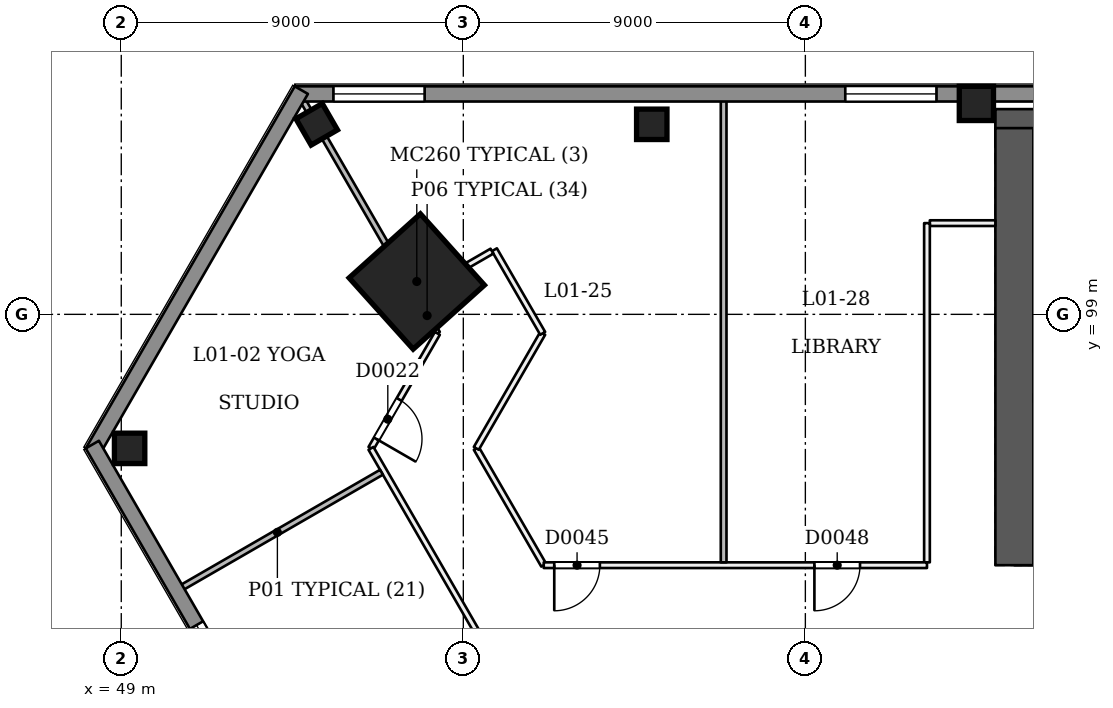
"""IFC4 building model, lengths in metres.
Left out: names, types, materials, properties, quantities, classifications, styles, units other than length and angle.
Written with IfcOpenShell. Run it as: python <this file> out.ifc"""

import sys

from ifc_helpers import new_model, si_unit, direction, frame, frame_2d, origin, origin_2d, place, context, subcontext, project, spatial, rectangle, extrude, element, fill, save


model = new_model("IFC4")
c1 = context("Model", 3, precision=1e-05, world=origin(), true_north=direction((0.0, 1.0)))
c2 = subcontext(c1, "Body", "Model", "MODEL_VIEW")
j1 = project(units=[si_unit("LENGTHUNIT", "METRE"), si_unit("PLANEANGLEUNIT", "RADIAN")], contexts=[c1])
p1 = place(None, origin())
s1 = spatial("IfcSite", under=j1, at=p1, CompositionType="ELEMENT")
p2 = place(p1, origin())
s2 = spatial("IfcBuilding", under=s1, at=p2, CompositionType="ELEMENT")
p3 = place(p2, frame((0.0, 0.0, 9.0)))
s3 = spatial("IfcBuildingStorey", under=s2, at=p3, CompositionType="ELEMENT", Elevation=9.0)
p4 = place(p3, frame((72.5, 92.9, 0.0), z_axis=(0.0, 0.0, 1.0), x_axis=(1.0, 0.0, 0.0)))
e1 = element("IfcWall", 1, at=p4, inside=s3, PredefinedType="SHEAR", context=c2, shape_type="SweptSolid", body=[
    extrude(rectangle(XDim=25.5, YDim=1.0, at=frame_2d((12.75, 0.0))), origin(), (0.0, 0.0, 1.0), 4.5),
])
p5 = place(p4, frame((1.3, 0.0, 0.0)))
e2 = element("IfcOpeningElement", 2, at=p5, cuts=e1, PredefinedType="OPENING", context=c2, shape_type="SweptSolid", body=[
    extrude(rectangle(XDim=1.2, YDim=2.1, at=frame_2d((0.6, 1.05))), frame((0.0, 0.51, 0.0), z_axis=(0.0, -1.0, 0.0), x_axis=(1.0, 0.0, 0.0)), (0.0, 0.0, 1.0), 1.021),
])
p6 = place(p4, frame((3.5, 0.0, 0.0)))
e3 = element("IfcOpeningElement", 3, at=p6, cuts=e1, PredefinedType="OPENING", context=c2, shape_type="SweptSolid", body=[
    extrude(rectangle(XDim=1.2, YDim=2.1, at=frame_2d((0.6, 1.05))), frame((0.0, 0.51, 0.0), z_axis=(0.0, -1.0, 0.0), x_axis=(1.0, 0.0, 0.0)), (0.0, 0.0, 1.0), 1.021),
])
p7 = place(p4, frame((13.5, 0.0, 0.0)))
e4 = element("IfcOpeningElement", 4, at=p7, cuts=e1, PredefinedType="OPENING", context=c2, shape_type="SweptSolid", body=[
    extrude(rectangle(XDim=1.2, YDim=2.1, at=frame_2d((0.6, 1.05))), frame((0.0, 0.51, 0.0), z_axis=(0.0, -1.0, 0.0), x_axis=(1.0, 0.0, 0.0)), (0.0, 0.0, 1.0), 1.021),
])
p8 = place(p4, frame((16.163, 0.0, 0.0)))
e5 = element("IfcOpeningElement", 5, at=p8, cuts=e1, PredefinedType="OPENING", context=c2, shape_type="SweptSolid", body=[
    extrude(rectangle(XDim=1.0, YDim=2.1, at=frame_2d((0.5, 1.05))), frame((0.0, 0.51, 0.0), z_axis=(0.0, -1.0, 0.0), x_axis=(1.0, 0.0, 0.0)), (0.0, 0.0, 1.0), 1.021),
])
p9 = place(p4, frame((18.95, 0.0, 0.0)))
e6 = element("IfcOpeningElement", 6, at=p9, cuts=e1, PredefinedType="OPENING", context=c2, shape_type="SweptSolid", body=[
    extrude(rectangle(XDim=1.0, YDim=2.1, at=frame_2d((0.5, 1.05))), frame((0.0, 0.51, 0.0), z_axis=(0.0, -1.0, 0.0), x_axis=(1.0, 0.0, 0.0)), (0.0, 0.0, 1.0), 1.021),
])
p10 = place(p4, frame((22.137, 0.0, 0.0)))
e7 = element("IfcOpeningElement", 7, at=p10, cuts=e1, PredefinedType="OPENING", context=c2, shape_type="SweptSolid", body=[
    extrude(rectangle(XDim=1.0, YDim=2.1, at=frame_2d((0.5, 1.05))), frame((0.0, 0.51, 0.0), z_axis=(0.0, -1.0, 0.0), x_axis=(1.0, 0.0, 0.0)), (0.0, 0.0, 1.0), 1.021),
])
p11 = place(p3, frame((97.5, 103.9, 0.0), z_axis=(0.0, 0.0, 1.0), x_axis=(-1.0, 0.0, 0.0)))
e8 = element("IfcWall", 8, at=p11, inside=s3, PredefinedType="SHEAR", context=c2, shape_type="SweptSolid", body=[
    extrude(rectangle(XDim=25.5, YDim=1.0, at=frame_2d((12.75, 0.0))), origin(), (0.0, 0.0, 1.0), 4.5),
])
p12 = place(p3, frame((72.5, 103.9, 0.0), z_axis=(0.0, 0.0, 1.0), x_axis=(0.0, -1.0, 0.0)))
e9 = element("IfcWall", 9, at=p12, inside=s3, PredefinedType="SHEAR", context=c2, shape_type="SweptSolid", body=[
    extrude(rectangle(XDim=11.5, YDim=1.0, at=frame_2d((5.75, 0.0))), origin(), (0.0, 0.0, 1.0), 4.5),
])
p13 = place(p3, frame((56.741, 99.853, 0.0), z_axis=(0.028416130736, 0.009218973712, 0.999553667412), x_axis=(-0.865053397917, 0.501282210701, 0.019969075775)))
e10 = element("IfcColumn", 10, at=p13, inside=s3, PredefinedType="COLUMN", context=c2, shape_type="SweptSolid", body=[
    extrude(rectangle(XDim=2.52, YDim=2.52, at=origin_2d()), origin(), (0.0, 0.0, 1.0), 4.502),
])
p14 = place(p3, frame((71.5, 104.55, 0.0), z_axis=(0.0, 0.0, 1.0), x_axis=(1.0, 0.0, 0.0)))
e11 = element("IfcColumn", 11, at=p14, inside=s3, PredefinedType="COLUMN", context=c2, shape_type="SweptSolid", body=[
    extrude(rectangle(XDim=0.9, YDim=0.9, at=origin_2d()), origin(), (0.0, 0.0, 1.0), 4.5),
])
for number, where, z_axis, x_axis in (
    (12, (62.959, 104.0, 0.0), (0.0, 0.0, 1.0), (1.0, 0.0, 0.0)),
    (13, (54.142, 104.0, 0.0), (0.0, 0.0, 1.0), (0.866, 0.5, 0.0)),
    (14, (49.219, 95.474, 0.0), (0.0, 0.0, 1.0), (1.0, 1.745e-08, 0.0)),
):
    element("IfcColumn", number, at=place(p3, frame(where, z_axis=z_axis, x_axis=x_axis)), inside=s3, PredefinedType="COLUMN", context=c2, shape_type="SweptSolid", body=[
        extrude(rectangle(XDim=0.8, YDim=0.8, at=origin_2d()), origin(), (0.0, 0.0, 1.0), 4.5),
    ])
p15 = place(p3, frame((56.778, 99.435, 0.0), z_axis=(0.0, 0.0, 1.0), x_axis=(0.500126914667, -0.865952117167, 0.0)))
e15 = element("IfcWall", 15, at=p15, inside=s3, PredefinedType="PARTITIONING", context=c2, shape_type="SweptSolid", body=[
    extrude(rectangle(XDim=1.08, YDim=0.15, at=frame_2d((0.54, 0.0))), origin(), (0.0, 0.0, 1.0), 4.05),
])
p16 = place(p3, frame((57.318, 98.5, 0.0), z_axis=(0.0, 0.0, 1.0), x_axis=(-0.500008701212, -0.866020380079, 0.0)))
e16 = element("IfcWall", 16, at=p16, inside=s3, PredefinedType="PARTITIONING", context=c2, shape_type="SweptSolid", body=[
    extrude(rectangle(XDim=3.495, YDim=0.15, at=frame_2d((1.747, 0.0))), origin(), (0.0, 0.0, 1.0), 4.05),
])
p17 = place(p16, frame((2.009, 0.0, 0.0)))
e17 = element("IfcOpeningElement", 17, at=p17, cuts=e16, PredefinedType="OPENING", context=c2, shape_type="SweptSolid", body=[
    extrude(rectangle(XDim=1.2, YDim=2.1, at=frame_2d((0.6, 1.05))), frame((0.0, 0.085, 0.0), z_axis=(0.0, -1.0, 0.0), x_axis=(1.0, 0.0, 0.0)), (0.0, 0.0, 1.0), 0.171),
])
p18 = place(p3, frame((55.57, 95.474, 0.0), z_axis=(0.0, 0.0, 1.0), x_axis=(0.500000085768, -0.866025354266, 0.0)))
e18 = element("IfcWall", 18, at=p18, inside=s3, PredefinedType="PARTITIONING", context=c2, shape_type="SweptSolid", body=[
    extrude(rectangle(XDim=55.365, YDim=0.15, at=frame_2d((27.682, 0.0))), origin(), (0.0, 0.0, 1.0), 4.05),
])
p19 = place(p18, frame((6.832, 0.0, 0.0)))
e19 = element("IfcOpeningElement", 19, at=p19, cuts=e18, PredefinedType="OPENING", context=c2, shape_type="SweptSolid", body=[
    extrude(rectangle(XDim=1.2, YDim=2.1, at=frame_2d((0.6, 1.05))), frame((0.0, 0.085, 0.0), z_axis=(0.0, -1.0, 0.0), x_axis=(1.0, 0.0, 0.0)), (0.0, 0.0, 1.0), 0.171),
])
p20 = place(p18, frame((18.182, 0.0, 0.0)))
e20 = element("IfcOpeningElement", 20, at=p20, cuts=e18, PredefinedType="OPENING", context=c2, shape_type="SweptSolid", body=[
    extrude(rectangle(XDim=1.0, YDim=2.1, at=frame_2d((0.5, 1.05))), frame((0.0, 0.085, 0.0), z_axis=(0.0, -1.0, 0.0), x_axis=(1.0, 0.0, 0.0)), (0.0, 0.0, 1.0), 0.171),
])
p21 = place(p18, frame((30.132, 0.0, 0.0)))
e21 = element("IfcOpeningElement", 21, at=p21, cuts=e18, PredefinedType="OPENING", context=c2, shape_type="SweptSolid", body=[
    extrude(rectangle(XDim=1.2, YDim=2.1, at=frame_2d((0.6, 1.05))), frame((0.0, 0.085, 0.0), z_axis=(0.0, -1.0, 0.0), x_axis=(1.0, 0.0, 0.0)), (0.0, 0.0, 1.0), 0.171),
])
p22 = place(p18, frame((40.582, 0.0, 0.0)))
e22 = element("IfcOpeningElement", 22, at=p22, cuts=e18, PredefinedType="OPENING", context=c2, shape_type="SweptSolid", body=[
    extrude(rectangle(XDim=1.2, YDim=2.1, at=frame_2d((0.6, 1.05))), frame((0.0, 0.085, 0.0), z_axis=(0.0, -1.0, 0.0), x_axis=(1.0, 0.0, 0.0)), (0.0, 0.0, 1.0), 0.171),
])
p23 = place(p18, frame((46.315, 0.0, 0.0)))
e23 = element("IfcOpeningElement", 23, at=p23, cuts=e18, PredefinedType="OPENING", context=c2, shape_type="SweptSolid", body=[
    extrude(rectangle(XDim=0.9, YDim=2.1, at=frame_2d((0.45, 1.05))), frame((0.0, 0.085, 0.0), z_axis=(0.0, -1.0, 0.0), x_axis=(1.0, 0.0, 0.0)), (0.0, 0.0, 1.0), 0.171),
])
p24 = place(p18, frame((48.565, 0.0, 0.0)))
e24 = element("IfcOpeningElement", 24, at=p24, cuts=e18, PredefinedType="OPENING", context=c2, shape_type="SweptSolid", body=[
    extrude(rectangle(XDim=0.9, YDim=2.1, at=frame_2d((0.45, 1.05))), frame((0.0, 0.085, 0.0), z_axis=(0.0, -1.0, 0.0), x_axis=(1.0, 0.0, 0.0)), (0.0, 0.0, 1.0), 0.171),
])
p25 = place(p18, frame((53.195, 0.0, 0.0)))
e25 = element("IfcOpeningElement", 25, at=p25, cuts=e18, PredefinedType="OPENING", context=c2, shape_type="SweptSolid", body=[
    extrude(rectangle(XDim=1.2, YDim=2.1, at=frame_2d((0.6, 1.05))), frame((0.0, 0.085, 0.0), z_axis=(0.0, -1.0, 0.0), x_axis=(1.0, 0.0, 0.0)), (0.0, 0.0, 1.0), 0.171),
])
p26 = place(p3, frame((60.116, 92.4, 0.0), z_axis=(0.0, 0.0, 1.0), x_axis=(-0.500008260065, 0.866020634781, 0.0)))
e26 = element("IfcWall", 26, at=p26, inside=s3, PredefinedType="PARTITIONING", context=c2, shape_type="SweptSolid", body=[
    extrude(rectangle(XDim=3.549, YDim=0.15, at=frame_2d((1.775, 0.0))), origin(), (0.0, 0.0, 1.0), 4.05),
])
p27 = place(p3, frame((58.342, 95.474, 0.0), z_axis=(0.0, 0.0, 1.0), x_axis=(0.500008701212, 0.866020380079, 0.0)))
e27 = element("IfcWall", 27, at=p27, inside=s3, PredefinedType="PARTITIONING", context=c2, shape_type="SweptSolid", body=[
    extrude(rectangle(XDim=3.495, YDim=0.15, at=frame_2d((1.747, 0.0))), origin(), (0.0, 0.0, 1.0), 4.05),
])
p28 = place(p3, frame((60.089, 98.5, 0.0), z_axis=(0.0, 0.0, 1.0), x_axis=(-0.500035802948, 0.866004731956, 0.0)))
e28 = element("IfcWall", 28, at=p28, inside=s3, PredefinedType="PARTITIONING", context=c2, shape_type="SweptSolid", body=[
    extrude(rectangle(XDim=2.54, YDim=0.15, at=frame_2d((1.27, 0.0))), origin(), (0.0, 0.0, 1.0), 4.05),
])
p29 = place(p3, frame((58.754, 100.663, 0.0), z_axis=(0.0, 0.0, 1.0), x_axis=(-0.866017533419, -0.500013631625, 0.0)))
e29 = element("IfcWall", 29, at=p29, inside=s3, PredefinedType="PARTITIONING", context=c2, shape_type="SweptSolid", body=[
    extrude(rectangle(XDim=2.25, YDim=0.15, at=frame_2d((1.125, 0.0))), origin(), (0.0, 0.0, 1.0), 4.05),
])
p30 = place(p3, frame((72.0, 101.4, 0.0), z_axis=(0.0, 0.0, 1.0), x_axis=(-1.0, 0.0, 0.0)))
e30 = element("IfcWall", 30, at=p30, inside=s3, PredefinedType="PARTITIONING", context=c2, shape_type="SweptSolid", body=[
    extrude(rectangle(XDim=1.725, YDim=0.15, at=frame_2d((0.863, 0.0))), origin(), (0.0, 0.0, 1.0), 4.05),
])
p31 = place(p3, frame((70.2, 101.4, 0.0), z_axis=(0.0, 0.0, 1.0), x_axis=(0.0, -1.0, 0.0)))
e31 = element("IfcWall", 31, at=p31, inside=s3, PredefinedType="PARTITIONING", context=c2, shape_type="SweptSolid", body=[
    extrude(rectangle(XDim=8.925, YDim=0.15, at=frame_2d((4.462, 0.0))), origin(), (0.0, 0.0, 1.0), 4.05),
])
p32 = place(p3, frame((70.2, 92.4, 0.0), z_axis=(0.0, 0.0, 1.0), x_axis=(-1.0, 0.0, 0.0)))
e32 = element("IfcWall", 32, at=p32, inside=s3, PredefinedType="PARTITIONING", context=c2, shape_type="SweptSolid", body=[
    extrude(rectangle(XDim=10.084, YDim=0.15, at=frame_2d((5.042, 0.0))), origin(), (0.0, 0.0, 1.0), 4.05),
])
p33 = place(p32, frame((8.607, 0.0, 0.0)))
e33 = element("IfcOpeningElement", 33, at=p33, cuts=e32, PredefinedType="OPENING", context=c2, shape_type="SweptSolid", body=[
    extrude(rectangle(XDim=1.2, YDim=2.1, at=frame_2d((0.6, 1.05))), frame((0.0, 0.085, 0.0), z_axis=(0.0, -1.0, 0.0), x_axis=(1.0, 0.0, 0.0)), (0.0, 0.0, 1.0), 0.171),
])
p34 = place(p32, frame((1.762, 0.0, 0.0)))
e34 = element("IfcOpeningElement", 34, at=p34, cuts=e32, PredefinedType="OPENING", context=c2, shape_type="SweptSolid", body=[
    extrude(rectangle(XDim=1.2, YDim=2.1, at=frame_2d((0.6, 1.05))), frame((0.0, 0.085, 0.0), z_axis=(0.0, -1.0, 0.0), x_axis=(1.0, 0.0, 0.0)), (0.0, 0.0, 1.0), 0.171),
])
p35 = place(p3, frame((50.369, 91.683, 0.0), z_axis=(0.0, 0.0, 1.0), x_axis=(0.866025537322, 0.499999768706, 0.0)))
e35 = element("IfcWall", 35, at=p35, inside=s3, PredefinedType="PARTITIONING", context=c2, shape_type="SweptSolid", body=[
    extrude(rectangle(XDim=6.325, YDim=0.15, at=frame_2d((3.163, 0.0))), origin(), (0.0, 0.0, 1.0), 4.05),
])
p36 = place(p3, frame((56.74, 99.5, 0.0), z_axis=(0.0, 0.0, 1.0), x_axis=(-0.500004896655, 0.866022576681, 0.0)))
e36 = element("IfcWall", 36, at=p36, inside=s3, PredefinedType="PARTITIONING", context=c2, shape_type="SweptSolid", body=[
    extrude(rectangle(XDim=6.235, YDim=0.15, at=frame_2d((3.118, 0.0))), origin(), (0.0, 0.0, 1.0), 4.05),
])
p37 = place(p3, frame((64.85, 92.475, 0.0), z_axis=(0.0, 0.0, 1.0), x_axis=(0.0, 1.0, 0.0)))
e37 = element("IfcWall", 37, at=p37, inside=s3, PredefinedType="PARTITIONING", context=c2, shape_type="SweptSolid", body=[
    extrude(rectangle(XDim=12.425, YDim=0.15, at=frame_2d((6.212, 0.0))), origin(), (0.0, 0.0, 1.0), 4.05),
])
p38 = place(p3, frame((53.565, 104.8, 0.0), z_axis=(0.0, 0.0, 1.0), x_axis=(1.0, 0.0, 0.0)))
e38 = element("IfcWall", 38, at=p38, inside=s3, PredefinedType="SOLIDWALL", context=c2, shape_type="SweptSolid", body=[
    extrude(rectangle(XDim=62.871, YDim=0.4, at=frame_2d((31.435, 0.0))), origin(), (0.0, 0.0, 1.0), 4.05),
])
p39 = place(p38, frame((59.452, 0.0, 0.9)))
e39 = element("IfcOpeningElement", 39, at=p39, cuts=e38, PredefinedType="OPENING", context=c2, shape_type="SweptSolid", body=[
    extrude(rectangle(XDim=2.4, YDim=1.5, at=frame_2d((1.2, 0.75))), frame((0.0, 0.21, 0.0), z_axis=(0.0, -1.0, 0.0), x_axis=(1.0, 0.0, 0.0)), (0.0, 0.0, 1.0), 0.421),
])
p40 = place(p38, frame((54.986, 0.0, 0.9)))
e40 = element("IfcOpeningElement", 40, at=p40, cuts=e38, PredefinedType="OPENING", context=c2, shape_type="SweptSolid", body=[
    extrude(rectangle(XDim=2.4, YDim=1.5, at=frame_2d((1.2, 0.75))), frame((0.0, 0.21, 0.0), z_axis=(0.0, -1.0, 0.0), x_axis=(1.0, 0.0, 0.0)), (0.0, 0.0, 1.0), 0.421),
])
p41 = place(p38, frame((45.986, 0.0, 0.9)))
e41 = element("IfcOpeningElement", 41, at=p41, cuts=e38, PredefinedType="OPENING", context=c2, shape_type="SweptSolid", body=[
    extrude(rectangle(XDim=2.4, YDim=1.5, at=frame_2d((1.2, 0.75))), frame((0.0, 0.21, 0.0), z_axis=(0.0, -1.0, 0.0), x_axis=(1.0, 0.0, 0.0)), (0.0, 0.0, 1.0), 0.421),
])
p42 = place(p38, frame((14.486, 0.0, 0.9)))
e42 = element("IfcOpeningElement", 42, at=p42, cuts=e38, PredefinedType="OPENING", context=c2, shape_type="SweptSolid", body=[
    extrude(rectangle(XDim=2.4, YDim=1.5, at=frame_2d((1.2, 0.75))), frame((0.0, 0.21, 0.0), z_axis=(0.0, -1.0, 0.0), x_axis=(1.0, 0.0, 0.0)), (0.0, 0.0, 1.0), 0.421),
])
p43 = place(p38, frame((1.018, 0.0, 0.9)))
e43 = element("IfcOpeningElement", 43, at=p43, cuts=e38, PredefinedType="OPENING", context=c2, shape_type="SweptSolid", body=[
    extrude(rectangle(XDim=2.4, YDim=1.5, at=frame_2d((1.2, 0.75))), frame((0.0, 0.21, 0.0), z_axis=(0.0, -1.0, 0.0), x_axis=(1.0, 0.0, 0.0)), (0.0, 0.0, 1.0), 0.421),
])
p44 = place(p3, frame((48.238, 95.374, 0.0), z_axis=(0.0, 0.0, 1.0), x_axis=(0.50000615651, 0.866021849293, 0.0)))
e44 = element("IfcWall", 44, at=p44, inside=s3, PredefinedType="SOLIDWALL", context=c2, shape_type="SweptSolid", body=[
    extrude(rectangle(XDim=11.0, YDim=0.4, at=frame_2d((5.5, 0.0))), origin(), (0.0, 0.0, 1.0), 4.05),
])
p45 = place(p3, frame((79.673, 41.126, 0.0), z_axis=(0.0, 0.0, 1.0), x_axis=(-0.499997306052, 0.866026959131, 0.0)))
e45 = element("IfcWall", 45, at=p45, inside=s3, PredefinedType="SOLIDWALL", context=c2, shape_type="SweptSolid", body=[
    extrude(rectangle(XDim=62.87, YDim=0.4, at=frame_2d((31.435, 0.0))), origin(), (0.0, 0.0, 1.0), 4.05),
])
p46 = place(p45, frame((54.986, 0.0, 0.9)))
e46 = element("IfcOpeningElement", 46, at=p46, cuts=e45, PredefinedType="OPENING", context=c2, shape_type="SweptSolid", body=[
    extrude(rectangle(XDim=2.4, YDim=1.5, at=frame_2d((1.2, 0.75))), frame((0.0, 0.21, 0.0), z_axis=(0.0, -1.0, 0.0), x_axis=(1.0, 0.0, 0.0)), (0.0, 0.0, 1.0), 0.421),
])
p47 = place(p45, frame((50.486, 0.0, 0.9)))
e47 = element("IfcOpeningElement", 47, at=p47, cuts=e45, PredefinedType="OPENING", context=c2, shape_type="SweptSolid", body=[
    extrude(rectangle(XDim=2.4, YDim=1.5, at=frame_2d((1.2, 0.75))), frame((0.0, 0.21, 0.0), z_axis=(0.0, -1.0, 0.0), x_axis=(1.0, 0.0, 0.0)), (0.0, 0.0, 1.0), 0.421),
])
p48 = place(p45, frame((45.986, 0.0, 0.9)))
e48 = element("IfcOpeningElement", 48, at=p48, cuts=e45, PredefinedType="OPENING", context=c2, shape_type="SweptSolid", body=[
    extrude(rectangle(XDim=2.4, YDim=1.5, at=frame_2d((1.2, 0.75))), frame((0.0, 0.21, 0.0), z_axis=(0.0, -1.0, 0.0), x_axis=(1.0, 0.0, 0.0)), (0.0, 0.0, 1.0), 0.421),
])
p49 = place(p45, frame((32.486, 0.0, 0.9)))
e49 = element("IfcOpeningElement", 49, at=p49, cuts=e45, PredefinedType="OPENING", context=c2, shape_type="SweptSolid", body=[
    extrude(rectangle(XDim=2.4, YDim=1.5, at=frame_2d((1.2, 0.75))), frame((0.0, 0.21, 0.0), z_axis=(0.0, -1.0, 0.0), x_axis=(1.0, 0.0, 0.0)), (0.0, 0.0, 1.0), 0.421),
])
p50 = place(p45, frame((27.986, 0.0, 0.9)))
e50 = element("IfcOpeningElement", 50, at=p50, cuts=e45, PredefinedType="OPENING", context=c2, shape_type="SweptSolid", body=[
    extrude(rectangle(XDim=2.4, YDim=1.5, at=frame_2d((1.2, 0.75))), frame((0.0, 0.21, 0.0), z_axis=(0.0, -1.0, 0.0), x_axis=(1.0, 0.0, 0.0)), (0.0, 0.0, 1.0), 0.421),
])
p51 = place(p45, frame((23.486, 0.0, 0.9)))
e51 = element("IfcOpeningElement", 51, at=p51, cuts=e45, PredefinedType="OPENING", context=c2, shape_type="SweptSolid", body=[
    extrude(rectangle(XDim=2.4, YDim=1.5, at=frame_2d((1.2, 0.75))), frame((0.0, 0.21, 0.0), z_axis=(0.0, -1.0, 0.0), x_axis=(1.0, 0.0, 0.0)), (0.0, 0.0, 1.0), 0.421),
])
p52 = place(p45, frame((18.986, 0.0, 0.9)))
e52 = element("IfcOpeningElement", 52, at=p52, cuts=e45, PredefinedType="OPENING", context=c2, shape_type="SweptSolid", body=[
    extrude(rectangle(XDim=2.4, YDim=1.5, at=frame_2d((1.2, 0.75))), frame((0.0, 0.21, 0.0), z_axis=(0.0, -1.0, 0.0), x_axis=(1.0, 0.0, 0.0)), (0.0, 0.0, 1.0), 0.421),
])
p53 = place(p45, frame((14.486, 0.0, 0.9)))
e53 = element("IfcOpeningElement", 53, at=p53, cuts=e45, PredefinedType="OPENING", context=c2, shape_type="SweptSolid", body=[
    extrude(rectangle(XDim=2.4, YDim=1.5, at=frame_2d((1.2, 0.75))), frame((0.0, 0.21, 0.0), z_axis=(0.0, -1.0, 0.0), x_axis=(1.0, 0.0, 0.0)), (0.0, 0.0, 1.0), 0.421),
])
p54 = place(p17, origin())
e54 = element("IfcDoor", 54, at=p54, inside=s3, OperationType="SINGLE_SWING_RIGHT", PredefinedType="NOTDEFINED", context=c2, shape_type="SweptSolid", body=[
    extrude(rectangle(XDim=1.2, YDim=2.1, at=frame_2d((0.6, 1.05))), frame((0.0, 0.025, 0.0), z_axis=(0.0, -1.0, 0.0), x_axis=(1.0, 0.0, 0.0)), (0.0, 0.0, 1.0), 0.05),
])
fill(e17, e54)
p55 = place(p33, origin())
e55 = element("IfcDoor", 55, at=p55, inside=s3, OperationType="SINGLE_SWING_RIGHT", PredefinedType="NOTDEFINED", context=c2, shape_type="SweptSolid", body=[
    extrude(rectangle(XDim=1.2, YDim=2.1, at=frame_2d((0.6, 1.05))), frame((0.0, 0.025, 0.0), z_axis=(0.0, -1.0, 0.0), x_axis=(1.0, 0.0, 0.0)), (0.0, 0.0, 1.0), 0.05),
])
fill(e33, e55)
p56 = place(p34, origin())
e56 = element("IfcDoor", 56, at=p56, inside=s3, OperationType="SINGLE_SWING_RIGHT", PredefinedType="NOTDEFINED", context=c2, shape_type="SweptSolid", body=[
    extrude(rectangle(XDim=1.2, YDim=2.1, at=frame_2d((0.6, 1.05))), frame((0.0, 0.025, 0.0), z_axis=(0.0, -1.0, 0.0), x_axis=(1.0, 0.0, 0.0)), (0.0, 0.0, 1.0), 0.05),
])
fill(e34, e56)
p57 = place(p42, origin())
e57 = element("IfcWindow", 57, at=p57, inside=s3, PartitioningType="SINGLE_PANEL", PredefinedType="WINDOW", context=c2, shape_type="SweptSolid", body=[
    extrude(rectangle(XDim=2.4, YDim=1.5, at=frame_2d((1.2, 0.75))), frame((0.0, 0.03, 0.0), z_axis=(0.0, -1.0, 0.0), x_axis=(1.0, 0.0, 0.0)), (0.0, 0.0, 1.0), 0.06),
])
fill(e42, e57)
p58 = place(p43, origin())
e58 = element("IfcWindow", 58, at=p58, inside=s3, PartitioningType="SINGLE_PANEL", PredefinedType="WINDOW", context=c2, shape_type="SweptSolid", body=[
    extrude(rectangle(XDim=2.4, YDim=1.5, at=frame_2d((1.2, 0.75))), frame((0.0, 0.03, 0.0), z_axis=(0.0, -1.0, 0.0), x_axis=(1.0, 0.0, 0.0)), (0.0, 0.0, 1.0), 0.06),
])
fill(e43, e58)
p59 = place(p46, origin())
e59 = element("IfcWindow", 59, at=p59, inside=s3, PartitioningType="SINGLE_PANEL", PredefinedType="WINDOW", context=c2, shape_type="SweptSolid", body=[
    extrude(rectangle(XDim=2.4, YDim=1.5, at=frame_2d((1.2, 0.75))), frame((0.0, 0.03, 0.0), z_axis=(0.0, -1.0, 0.0), x_axis=(1.0, 0.0, 0.0)), (0.0, 0.0, 1.0), 0.06),
])
fill(e46, e59)
save(model, sys.argv[1])
